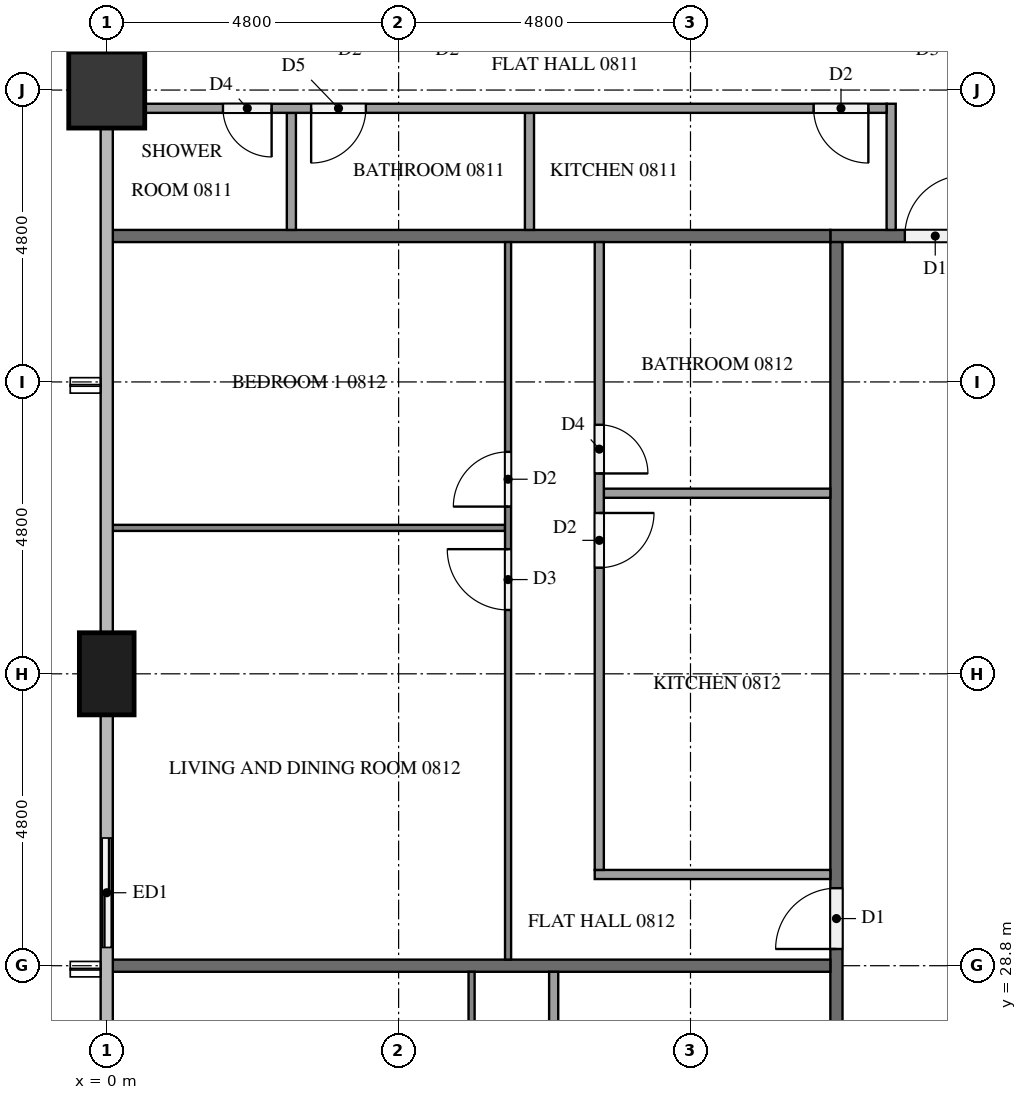
"""IFC4 building model, lengths in metres.
Left out: names, types, materials, properties, quantities, classifications, styles, units other than length and angle.
Written with IfcOpenShell. Run it as: python <this file> out.ifc"""

import sys

from ifc_helpers import new_model, si_unit, direction, frame, frame_2d, origin, origin_2d, place, context, subcontext, project, spatial, rectangle, extrude, element, fill, save


model = new_model("IFC4")
c1 = context("Model", 3, precision=1e-05, world=origin(), true_north=direction((0.0, 1.0)))
c2 = subcontext(c1, "Body", "Model", "MODEL_VIEW")
j1 = project(units=[si_unit("LENGTHUNIT", "METRE"), si_unit("PLANEANGLEUNIT", "RADIAN")], contexts=[c1])
p1 = place(None, origin())
s1 = spatial("IfcSite", under=j1, at=p1, CompositionType="ELEMENT")
p2 = place(p1, origin())
s2 = spatial("IfcBuilding", under=s1, at=p2, CompositionType="ELEMENT")
p3 = place(p2, frame((0.0, 0.0, 36.4)))
s3 = spatial("IfcBuildingStorey", under=s2, at=p3, CompositionType="ELEMENT", Elevation=36.4)
p4 = place(p3, frame((0.0, 43.2, 0.0), z_axis=(0.0, 0.0, 1.0), x_axis=(1.0, 0.0, 0.0)))
e1 = element("IfcColumn", 1, at=p4, inside=s3, PredefinedType="COLUMN", context=c2, shape_type="SweptSolid", body=[
    extrude(rectangle(XDim=1.25, YDim=1.25, at=origin_2d()), origin(), (0.0, 0.0, 1.0), 3.2),
])
p5 = place(p3, frame((0.0, 33.6, 0.0), z_axis=(0.0, 0.0, 1.0), x_axis=(0.0, 1.0, 0.0)))
e2 = element("IfcColumn", 2, at=p5, inside=s3, PredefinedType="COLUMN", context=c2, shape_type="SweptSolid", body=[
    extrude(rectangle(XDim=1.35, YDim=0.9, at=origin_2d()), origin(), (0.0, 0.0, 1.0), 3.2),
])
p6 = place(p3, frame((0.0, 31.2, 0.0), z_axis=(0.0, 0.0, 1.0), x_axis=(0.0, -1.0, 0.0)))
e3 = element("IfcWall", 3, at=p6, inside=s3, PredefinedType="SOLIDWALL", context=c2, shape_type="SweptSolid", body=[
    extrude(rectangle(XDim=2.4, YDim=0.15, at=frame_2d((1.2, 0.0))), origin(), (0.0, 0.0, 1.0), 3.2),
])
p7 = place(p6, frame((0.3, 0.0, 0.0)))
e4 = element("IfcOpeningElement", 4, at=p7, cuts=e3, PredefinedType="OPENING", context=c2, shape_type="SweptSolid", body=[
    extrude(rectangle(XDim=1.8, YDim=2.4, at=frame_2d((0.9, 1.2))), frame((0.0, 0.085, 0.0), z_axis=(0.0, -1.0, 0.0), x_axis=(1.0, 0.0, 0.0)), (0.0, 0.0, 1.0), 0.17),
])
p8 = place(p3, frame((11.9, 40.8, 0.0), z_axis=(0.0, 0.0, 1.0), x_axis=(1.0, 0.0, 0.0)))
e5 = element("IfcWall", 5, at=p8, inside=s3, PredefinedType="PARTITIONING", context=c2, shape_type="SweptSolid", body=[
    extrude(rectangle(XDim=38.6, YDim=0.2, at=frame_2d((19.3, 0.0))), origin(), (0.0, 0.0, 1.0), 3.2),
])
p9 = place(p8, frame((37.225, 0.0, 0.0)))
e6 = element("IfcOpeningElement", 6, at=p9, cuts=e5, PredefinedType="OPENING", context=c2, shape_type="SweptSolid", body=[
    extrude(rectangle(XDim=1.0, YDim=2.1, at=frame_2d((0.5, 1.05))), frame((0.0, 0.11, 0.0), z_axis=(0.0, -1.0, 0.0), x_axis=(1.0, 0.0, 0.0)), (0.0, 0.0, 1.0), 0.22),
])
p10 = place(p8, frame((30.025, 0.0, 0.0)))
e7 = element("IfcOpeningElement", 7, at=p10, cuts=e5, PredefinedType="OPENING", context=c2, shape_type="SweptSolid", body=[
    extrude(rectangle(XDim=1.0, YDim=2.1, at=frame_2d((0.5, 1.05))), frame((0.0, 0.11, 0.0), z_axis=(0.0, -1.0, 0.0), x_axis=(1.0, 0.0, 0.0)), (0.0, 0.0, 1.0), 0.22),
])
p11 = place(p8, frame((2.725, 0.0, 0.0)))
e8 = element("IfcOpeningElement", 8, at=p11, cuts=e5, PredefinedType="OPENING", context=c2, shape_type="SweptSolid", body=[
    extrude(rectangle(XDim=1.1, YDim=2.1, at=frame_2d((0.55, 1.05))), frame((0.0, 0.11, 0.0), z_axis=(0.0, -1.0, 0.0), x_axis=(1.0, 0.0, 0.0)), (0.0, 0.0, 1.0), 0.22),
])
p12 = place(p8, frame((1.225, 0.0, 0.0)))
e9 = element("IfcOpeningElement", 9, at=p12, cuts=e5, PredefinedType="OPENING", context=c2, shape_type="SweptSolid", body=[
    extrude(rectangle(XDim=1.0, YDim=2.1, at=frame_2d((0.5, 1.05))), frame((0.0, 0.11, 0.0), z_axis=(0.0, -1.0, 0.0), x_axis=(1.0, 0.0, 0.0)), (0.0, 0.0, 1.0), 0.22),
])
p13 = place(p3, frame((12.0, 12.1, 0.0), z_axis=(0.0, 0.0, 1.0), x_axis=(0.0, 1.0, 0.0)))
e10 = element("IfcWall", 10, at=p13, inside=s3, PredefinedType="PARTITIONING", context=c2, shape_type="SweptSolid", body=[
    extrude(rectangle(XDim=28.6, YDim=0.2, at=frame_2d((14.3, 0.0))), origin(), (0.0, 0.0, 1.0), 3.2),
])
p14 = place(p13, frame((16.975, 0.0, 0.0)))
e11 = element("IfcOpeningElement", 11, at=p14, cuts=e10, PredefinedType="OPENING", context=c2, shape_type="SweptSolid", body=[
    extrude(rectangle(XDim=1.0, YDim=2.1, at=frame_2d((0.5, 1.05))), frame((0.0, 0.11, 0.0), z_axis=(0.0, -1.0, 0.0), x_axis=(1.0, 0.0, 0.0)), (0.0, 0.0, 1.0), 0.22),
])
p15 = place(p13, frame((0.175, 0.0, 0.0)))
e12 = element("IfcOpeningElement", 12, at=p15, cuts=e10, PredefinedType="OPENING", context=c2, shape_type="SweptSolid", body=[
    extrude(rectangle(XDim=1.0, YDim=2.1, at=frame_2d((0.5, 1.05))), frame((0.0, 0.11, 0.0), z_axis=(0.0, -1.0, 0.0), x_axis=(1.0, 0.0, 0.0)), (0.0, 0.0, 1.0), 0.22),
])
for number, where, z_axis, x_axis in (
    (13, (0.1, 40.8, 0.0), (0.0, 0.0, 1.0), (1.0, 0.0, 0.0)),
    (14, (0.1, 28.8, 0.0), (0.0, 0.0, 1.0), (1.0, 0.0, 0.0)),
):
    element("IfcWall", number, at=place(p3, frame(where, z_axis=z_axis, x_axis=x_axis)), inside=s3, PredefinedType="PARTITIONING", context=c2, shape_type="SweptSolid", body=[
        extrude(rectangle(XDim=11.8, YDim=0.2, at=frame_2d((5.9, 0.0))), origin(), (0.0, 0.0, 1.0), 3.2),
    ])
for number, where, z_axis, x_axis in (
    (15, (6.952, 40.9, 0.0), (0.0, 0.0, 1.0), (0.0, 1.0, 0.0)),
    (16, (3.037, 40.9, 0.0), (0.0, 0.0, 1.0), (0.0, 1.0, 0.0)),
):
    element("IfcWall", number, at=place(p3, frame(where, z_axis=z_axis, x_axis=x_axis)), inside=s3, PredefinedType="PARTITIONING", context=c2, shape_type="SweptSolid", body=[
        extrude(rectangle(XDim=1.925, YDim=0.15, at=frame_2d((0.962, 0.0))), origin(), (0.0, 0.0, 1.0), 3.2),
    ])
p16 = place(p3, frame((12.9, 40.9, 0.0), z_axis=(0.0, 0.0, 1.0), x_axis=(0.0, 1.0, 0.0)))
e17 = element("IfcWall", 17, at=p16, inside=s3, PredefinedType="PARTITIONING", context=c2, shape_type="SweptSolid", body=[
    extrude(rectangle(XDim=2.075, YDim=0.15, at=frame_2d((1.038, 0.0))), origin(), (0.0, 0.0, 1.0), 3.2),
])
p17 = place(p3, frame((12.825, 42.9, 0.0), z_axis=(0.0, 0.0, 1.0), x_axis=(-1.0, 0.0, 0.0)))
e18 = element("IfcWall", 18, at=p17, inside=s3, PredefinedType="PARTITIONING", context=c2, shape_type="SweptSolid", body=[
    extrude(rectangle(XDim=12.2, YDim=0.15, at=frame_2d((6.1, 0.0))), origin(), (0.0, 0.0, 1.0), 3.2),
])
p18 = place(p17, frame((0.3, 0.0, 0.0)))
e19 = element("IfcOpeningElement", 19, at=p18, cuts=e18, PredefinedType="OPENING", context=c2, shape_type="SweptSolid", body=[
    extrude(rectangle(XDim=0.9, YDim=2.1, at=frame_2d((0.45, 1.05))), frame((0.0, 0.085, 0.0), z_axis=(0.0, -1.0, 0.0), x_axis=(1.0, 0.0, 0.0)), (0.0, 0.0, 1.0), 0.17),
])
p19 = place(p17, frame((8.563, 0.0, 0.0)))
e20 = element("IfcOpeningElement", 20, at=p19, cuts=e18, PredefinedType="OPENING", context=c2, shape_type="SweptSolid", body=[
    extrude(rectangle(XDim=0.9, YDim=2.1, at=frame_2d((0.45, 1.05))), frame((0.0, 0.085, 0.0), z_axis=(0.0, -1.0, 0.0), x_axis=(1.0, 0.0, 0.0)), (0.0, 0.0, 1.0), 0.17),
])
p20 = place(p17, frame((10.114, 0.0, 0.0)))
e21 = element("IfcOpeningElement", 21, at=p20, cuts=e18, PredefinedType="OPENING", context=c2, shape_type="SweptSolid", body=[
    extrude(rectangle(XDim=0.8, YDim=2.1, at=frame_2d((0.4, 1.05))), frame((0.0, 0.085, 0.0), z_axis=(0.0, -1.0, 0.0), x_axis=(1.0, 0.0, 0.0)), (0.0, 0.0, 1.0), 0.17),
])
p21 = place(p3, frame((6.55, 36.0, 0.0), z_axis=(0.0, 0.0, 1.0), x_axis=(-1.0, 0.0, 0.0)))
e22 = element("IfcWall", 22, at=p21, inside=s3, PredefinedType="PARTITIONING", context=c2, shape_type="SweptSolid", body=[
    extrude(rectangle(XDim=6.45, YDim=0.1, at=frame_2d((3.225, 0.0))), origin(), (0.0, 0.0, 1.0), 3.2),
])
p22 = place(p3, frame((6.6, 28.9, 0.0), z_axis=(0.0, 0.0, 1.0), x_axis=(0.0, 1.0, 0.0)))
e23 = element("IfcWall", 23, at=p22, inside=s3, PredefinedType="PARTITIONING", context=c2, shape_type="SweptSolid", body=[
    extrude(rectangle(XDim=11.8, YDim=0.1, at=frame_2d((5.9, 0.0))), origin(), (0.0, 0.0, 1.0), 3.2),
])
p23 = place(p22, frame((5.75, 0.0, 0.0)))
e24 = element("IfcOpeningElement", 24, at=p23, cuts=e23, PredefinedType="OPENING", context=c2, shape_type="SweptSolid", body=[
    extrude(rectangle(XDim=1.0, YDim=2.1, at=frame_2d((0.5, 1.05))), frame((0.0, 0.06, 0.0), z_axis=(0.0, -1.0, 0.0), x_axis=(1.0, 0.0, 0.0)), (0.0, 0.0, 1.0), 0.12),
])
p24 = place(p22, frame((7.45, 0.0, 0.0)))
e25 = element("IfcOpeningElement", 25, at=p24, cuts=e23, PredefinedType="OPENING", context=c2, shape_type="SweptSolid", body=[
    extrude(rectangle(XDim=0.9, YDim=2.1, at=frame_2d((0.45, 1.05))), frame((0.0, 0.06, 0.0), z_axis=(0.0, -1.0, 0.0), x_axis=(1.0, 0.0, 0.0)), (0.0, 0.0, 1.0), 0.12),
])
p25 = place(p3, frame((11.9, 36.57, 0.0), z_axis=(0.0, 0.0, 1.0), x_axis=(-1.0, 0.0, 0.0)))
e26 = element("IfcWall", 26, at=p25, inside=s3, PredefinedType="PARTITIONING", context=c2, shape_type="SweptSolid", body=[
    extrude(rectangle(XDim=3.725, YDim=0.15, at=frame_2d((1.862, 0.0))), origin(), (0.0, 0.0, 1.0), 3.2),
])
p26 = place(p3, frame((11.9, 30.3, 0.0), z_axis=(0.0, 0.0, 1.0), x_axis=(-1.0, 0.0, 0.0)))
e27 = element("IfcWall", 27, at=p26, inside=s3, PredefinedType="PARTITIONING", context=c2, shape_type="SweptSolid", body=[
    extrude(rectangle(XDim=3.875, YDim=0.15, at=frame_2d((1.938, 0.0))), origin(), (0.0, 0.0, 1.0), 3.2),
])
p27 = place(p3, frame((8.1, 40.7, 0.0), z_axis=(0.0, 0.0, 1.0), x_axis=(0.0, -1.0, 0.0)))
e28 = element("IfcWall", 28, at=p27, inside=s3, PredefinedType="PARTITIONING", context=c2, shape_type="SweptSolid", body=[
    extrude(rectangle(XDim=10.325, YDim=0.15, at=frame_2d((5.163, 0.0))), origin(), (0.0, 0.0, 1.0), 3.2),
])
p28 = place(p27, frame((4.455, 0.0, 0.0)))
e29 = element("IfcOpeningElement", 29, at=p28, cuts=e28, PredefinedType="OPENING", context=c2, shape_type="SweptSolid", body=[
    extrude(rectangle(XDim=0.9, YDim=2.1, at=frame_2d((0.45, 1.05))), frame((0.0, 0.085, 0.0), z_axis=(0.0, -1.0, 0.0), x_axis=(1.0, 0.0, 0.0)), (0.0, 0.0, 1.0), 0.17),
])
p29 = place(p27, frame((3.005, 0.0, 0.0)))
e30 = element("IfcOpeningElement", 30, at=p29, cuts=e28, PredefinedType="OPENING", context=c2, shape_type="SweptSolid", body=[
    extrude(rectangle(XDim=0.8, YDim=2.1, at=frame_2d((0.4, 1.05))), frame((0.0, 0.085, 0.0), z_axis=(0.0, -1.0, 0.0), x_axis=(1.0, 0.0, 0.0)), (0.0, 0.0, 1.0), 0.17),
])
p30 = place(p3, frame((6.0, 12.1, 0.0), z_axis=(0.0, 0.0, 1.0), x_axis=(0.0, 1.0, 0.0)))
e31 = element("IfcWall", 31, at=p30, inside=s3, PredefinedType="PARTITIONING", context=c2, shape_type="SweptSolid", body=[
    extrude(rectangle(XDim=16.6, YDim=0.1, at=frame_2d((8.3, 0.0))), origin(), (0.0, 0.0, 1.0), 3.2),
])
p31 = place(p30, frame((0.3, 0.0, 0.0)))
e32 = element("IfcOpeningElement", 32, at=p31, cuts=e31, PredefinedType="OPENING", context=c2, shape_type="SweptSolid", body=[
    extrude(rectangle(XDim=1.0, YDim=2.1, at=frame_2d((0.5, 1.05))), frame((0.0, 0.06, 0.0), z_axis=(0.0, -1.0, 0.0), x_axis=(1.0, 0.0, 0.0)), (0.0, 0.0, 1.0), 0.12),
])
p32 = place(p30, frame((10.65, 0.0, 0.0)))
e33 = element("IfcOpeningElement", 33, at=p32, cuts=e31, PredefinedType="OPENING", context=c2, shape_type="SweptSolid", body=[
    extrude(rectangle(XDim=0.9, YDim=2.1, at=frame_2d((0.45, 1.05))), frame((0.0, 0.06, 0.0), z_axis=(0.0, -1.0, 0.0), x_axis=(1.0, 0.0, 0.0)), (0.0, 0.0, 1.0), 0.12),
])
p33 = place(p30, frame((12.25, 0.0, 0.0)))
e34 = element("IfcOpeningElement", 34, at=p33, cuts=e31, PredefinedType="OPENING", context=c2, shape_type="SweptSolid", body=[
    extrude(rectangle(XDim=0.9, YDim=2.1, at=frame_2d((0.45, 1.05))), frame((0.0, 0.06, 0.0), z_axis=(0.0, -1.0, 0.0), x_axis=(1.0, 0.0, 0.0)), (0.0, 0.0, 1.0), 0.12),
])
p34 = place(p3, frame((7.35, 28.7, 0.0), z_axis=(0.0, 0.0, 1.0), x_axis=(0.0, -1.0, 0.0)))
e35 = element("IfcWall", 35, at=p34, inside=s3, PredefinedType="PARTITIONING", context=c2, shape_type="SweptSolid", body=[
    extrude(rectangle(XDim=15.125, YDim=0.15, at=frame_2d((7.562, 0.0))), origin(), (0.0, 0.0, 1.0), 3.2),
])
p35 = place(p34, frame((13.925, 0.0, 0.0)))
e36 = element("IfcOpeningElement", 36, at=p35, cuts=e35, PredefinedType="OPENING", context=c2, shape_type="SweptSolid", body=[
    extrude(rectangle(XDim=0.9, YDim=2.1, at=frame_2d((0.45, 1.05))), frame((0.0, 0.085, 0.0), z_axis=(0.0, -1.0, 0.0), x_axis=(1.0, 0.0, 0.0)), (0.0, 0.0, 1.0), 0.17),
])
p36 = place(p34, frame((3.815, 0.0, 0.0)))
e37 = element("IfcOpeningElement", 37, at=p36, cuts=e35, PredefinedType="OPENING", context=c2, shape_type="SweptSolid", body=[
    extrude(rectangle(XDim=0.9, YDim=2.1, at=frame_2d((0.45, 1.05))), frame((0.0, 0.085, 0.0), z_axis=(0.0, -1.0, 0.0), x_axis=(1.0, 0.0, 0.0)), (0.0, 0.0, 1.0), 0.17),
])
p37 = place(p34, frame((2.365, 0.0, 0.0)))
e38 = element("IfcOpeningElement", 38, at=p37, cuts=e35, PredefinedType="OPENING", context=c2, shape_type="SweptSolid", body=[
    extrude(rectangle(XDim=0.8, YDim=2.1, at=frame_2d((0.4, 1.05))), frame((0.0, 0.085, 0.0), z_axis=(0.0, -1.0, 0.0), x_axis=(1.0, 0.0, 0.0)), (0.0, 0.0, 1.0), 0.17),
])
p38 = place(p7, origin())
e39 = element("IfcDoor", 39, at=p38, inside=s3, OperationType="SLIDING_TO_RIGHT", PredefinedType="DOOR", context=c2, shape_type="SweptSolid", body=[
    extrude(rectangle(XDim=1.8, YDim=2.4, at=frame_2d((0.9, 1.2))), frame((0.0, 0.025, 0.0), z_axis=(0.0, -1.0, 0.0), x_axis=(1.0, 0.0, 0.0)), (0.0, 0.0, 1.0), 0.05),
])
fill(e4, e39)
p39 = place(p12, origin())
e40 = element("IfcDoor", 40, at=p39, inside=s3, OperationType="SINGLE_SWING_RIGHT", PredefinedType="DOOR", context=c2, shape_type="SweptSolid", body=[
    extrude(rectangle(XDim=1.0, YDim=2.1, at=frame_2d((0.5, 1.05))), frame((0.0, 0.025, 0.0), z_axis=(0.0, -1.0, 0.0), x_axis=(1.0, 0.0, 0.0)), (0.0, 0.0, 1.0), 0.05),
])
fill(e9, e40)
p40 = place(p14, origin())
e41 = element("IfcDoor", 41, at=p40, inside=s3, OperationType="SINGLE_SWING_LEFT", PredefinedType="DOOR", context=c2, shape_type="SweptSolid", body=[
    extrude(rectangle(XDim=1.0, YDim=2.1, at=frame_2d((0.5, 1.05))), frame((0.0, 0.025, 0.0), z_axis=(0.0, -1.0, 0.0), x_axis=(1.0, 0.0, 0.0)), (0.0, 0.0, 1.0), 0.05),
])
fill(e11, e41)
p41 = place(p18, origin())
e42 = element("IfcDoor", 42, at=p41, inside=s3, OperationType="SINGLE_SWING_LEFT", PredefinedType="DOOR", context=c2, shape_type="SweptSolid", body=[
    extrude(rectangle(XDim=0.9, YDim=2.1, at=frame_2d((0.45, 1.05))), frame((0.0, 0.025, 0.0), z_axis=(0.0, -1.0, 0.0), x_axis=(1.0, 0.0, 0.0)), (0.0, 0.0, 1.0), 0.05),
])
fill(e19, e42)
p42 = place(p19, origin())
e43 = element("IfcDoor", 43, at=p42, inside=s3, OperationType="SINGLE_SWING_RIGHT", PredefinedType="DOOR", context=c2, shape_type="SweptSolid", body=[
    extrude(rectangle(XDim=0.9, YDim=2.1, at=frame_2d((0.45, 1.05))), frame((0.0, 0.025, 0.0), z_axis=(0.0, -1.0, 0.0), x_axis=(1.0, 0.0, 0.0)), (0.0, 0.0, 1.0), 0.05),
])
fill(e20, e43)
p43 = place(p20, origin())
e44 = element("IfcDoor", 44, at=p43, inside=s3, OperationType="SINGLE_SWING_LEFT", PredefinedType="DOOR", context=c2, shape_type="SweptSolid", body=[
    extrude(rectangle(XDim=0.8, YDim=2.1, at=frame_2d((0.4, 1.05))), frame((0.0, 0.025, 0.0), z_axis=(0.0, -1.0, 0.0), x_axis=(1.0, 0.0, 0.0)), (0.0, 0.0, 1.0), 0.05),
])
fill(e21, e44)
p44 = place(p23, origin())
e45 = element("IfcDoor", 45, at=p44, inside=s3, OperationType="SINGLE_SWING_RIGHT", PredefinedType="DOOR", context=c2, shape_type="SweptSolid", body=[
    extrude(rectangle(XDim=1.0, YDim=2.1, at=frame_2d((0.5, 1.05))), frame((0.0, 0.025, 0.0), z_axis=(0.0, -1.0, 0.0), x_axis=(1.0, 0.0, 0.0)), (0.0, 0.0, 1.0), 0.05),
])
fill(e24, e45)
p45 = place(p24, origin())
e46 = element("IfcDoor", 46, at=p45, inside=s3, OperationType="SINGLE_SWING_LEFT", PredefinedType="DOOR", context=c2, shape_type="SweptSolid", body=[
    extrude(rectangle(XDim=0.9, YDim=2.1, at=frame_2d((0.45, 1.05))), frame((0.0, 0.025, 0.0), z_axis=(0.0, -1.0, 0.0), x_axis=(1.0, 0.0, 0.0)), (0.0, 0.0, 1.0), 0.05),
])
fill(e25, e46)
p46 = place(p28, origin())
e47 = element("IfcDoor", 47, at=p46, inside=s3, OperationType="SINGLE_SWING_LEFT", PredefinedType="DOOR", context=c2, shape_type="SweptSolid", body=[
    extrude(rectangle(XDim=0.9, YDim=2.1, at=frame_2d((0.45, 1.05))), frame((0.0, 0.025, 0.0), z_axis=(0.0, -1.0, 0.0), x_axis=(1.0, 0.0, 0.0)), (0.0, 0.0, 1.0), 0.05),
])
fill(e29, e47)
p47 = place(p29, origin())
e48 = element("IfcDoor", 48, at=p47, inside=s3, OperationType="SINGLE_SWING_RIGHT", PredefinedType="DOOR", context=c2, shape_type="SweptSolid", body=[
    extrude(rectangle(XDim=0.8, YDim=2.1, at=frame_2d((0.4, 1.05))), frame((0.0, 0.025, 0.0), z_axis=(0.0, -1.0, 0.0), x_axis=(1.0, 0.0, 0.0)), (0.0, 0.0, 1.0), 0.05),
])
fill(e30, e48)
save(model, sys.argv[1])
